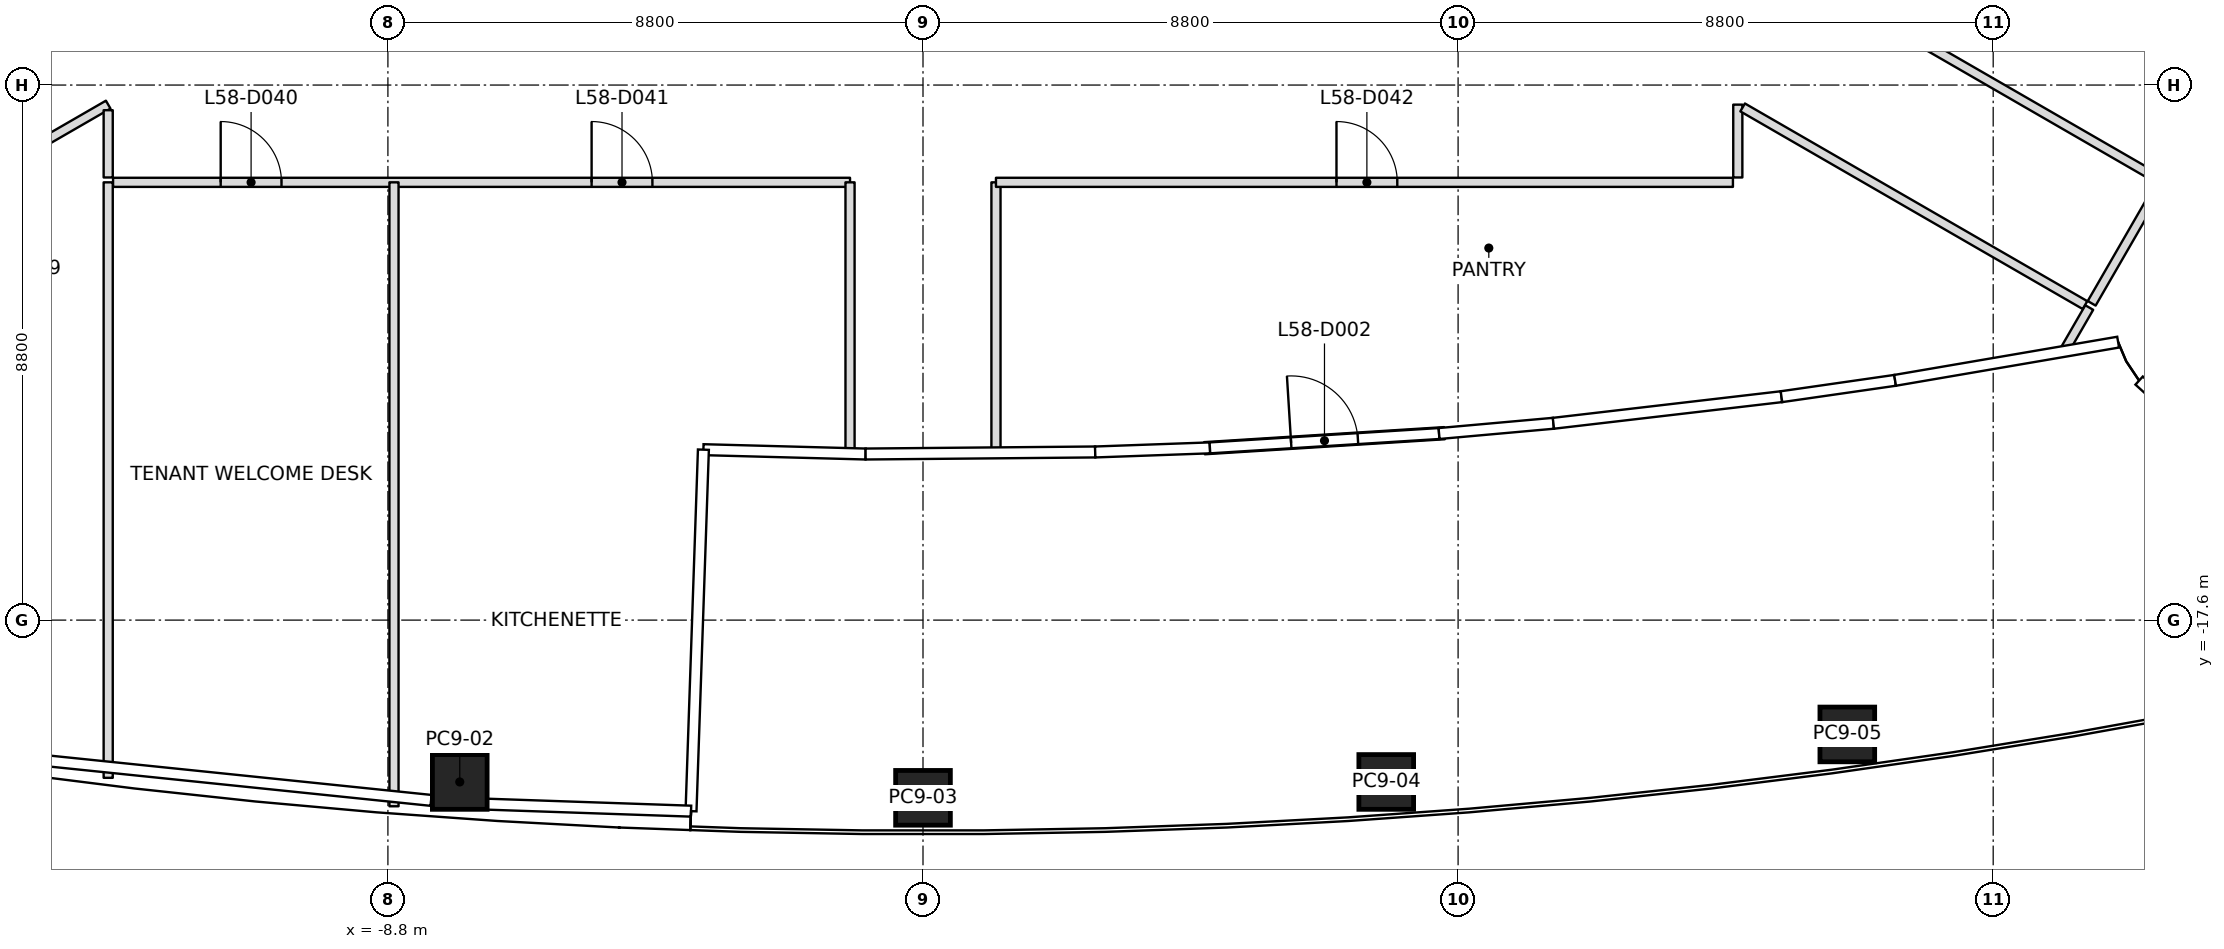
"""IFC4 building model, lengths in metres.
Left out: names, types, materials, properties, quantities, classifications, styles, units other than length and angle.
Written with IfcOpenShell. Run it as: python <this file> out.ifc"""

import sys

from ifc_helpers import new_model, si_unit, direction, frame, frame_2d, origin, origin_2d, place, context, subcontext, project, spatial, rectangle, extrude, element, fill, save


model = new_model("IFC4")
c1 = context("Model", 3, precision=1e-05, world=origin(), true_north=direction((0.0, 1.0)))
c2 = subcontext(c1, "Body", "Model", "MODEL_VIEW")
j1 = project(units=[si_unit("LENGTHUNIT", "METRE"), si_unit("PLANEANGLEUNIT", "RADIAN")], contexts=[c1])
p1 = place(None, origin())
s1 = spatial("IfcSite", under=j1, at=p1, CompositionType="ELEMENT")
p2 = place(p1, origin())
s2 = spatial("IfcBuilding", under=s1, at=p2, CompositionType="ELEMENT")
p3 = place(p2, frame((0.0, 0.0, 259.0)))
s3 = spatial("IfcBuildingStorey", under=s2, at=p3, CompositionType="ELEMENT", Elevation=259.0)
p4 = place(p3, frame((-7.618, -20.262, 0.0), z_axis=(0.008788174922, 0.01116830563, 0.999899013366), x_axis=(-0.997618130279, 0.068512919133, 0.008002877598)))
e1 = element("IfcColumn", 1, at=p4, inside=s3, PredefinedType="COLUMN", context=c2, shape_type="SweptSolid", body=[
    extrude(rectangle(XDim=0.9, YDim=0.9, at=origin_2d()), origin(), (0.0, 0.0, 1.0), 4.0),
])
p5 = place(p3, frame((0.0, -20.523, 0.0), z_axis=(0.0, 0.011473854038, 0.99993417317), x_axis=(1.0, 0.0, 0.0)))
e2 = element("IfcColumn", 2, at=p5, inside=s3, PredefinedType="COLUMN", context=c2, shape_type="SweptSolid", body=[
    extrude(rectangle(XDim=0.9, YDim=0.9, at=origin_2d()), origin(), (0.0, 0.0, 1.0), 4.0),
])
p6 = place(p3, frame((7.618, -20.262, 0.0), z_axis=(-0.008788174922, 0.01116830563, 0.999899013366), x_axis=(0.997618130279, 0.068512919133, 0.008002877598)))
e3 = element("IfcColumn", 3, at=p6, inside=s3, PredefinedType="COLUMN", context=c2, shape_type="SweptSolid", body=[
    extrude(rectangle(XDim=0.9, YDim=0.9, at=origin_2d()), origin(), (0.0, 0.0, 1.0), 4.0),
])
p7 = place(p3, frame((15.201, -19.48, 0.0), z_axis=(-0.017452445502, 0.010434853779, 0.999793241612), x_axis=(0.990486490869, 0.136692598023, 0.015863324104)))
e4 = element("IfcColumn", 4, at=p7, inside=s3, PredefinedType="COLUMN", context=c2, shape_type="SweptSolid", body=[
    extrude(rectangle(XDim=0.9, YDim=0.9, at=origin_2d()), origin(), (0.0, 0.0, 1.0), 4.001),
])
p8 = place(p3, frame((4.629, -14.773, 0.0), z_axis=(0.0, 0.0, 1.0), x_axis=(0.99804368287, 0.062520453327, 0.0)))
e5 = element("IfcWall", 5, at=p8, inside=s3, PredefinedType="SOLIDWALL", context=c2, shape_type="SweptSolid", body=[
    extrude(rectangle(XDim=3.956, YDim=0.2, at=frame_2d((1.978, 0.0))), origin(), (0.0, 0.0, 1.0), 3.34),
])
p9 = place(p8, frame((1.428, 0.0, 0.0)))
e6 = element("IfcOpeningElement", 6, at=p9, cuts=e5, PredefinedType="OPENING", context=c2, shape_type="SweptSolid", body=[
    extrude(rectangle(XDim=1.1, YDim=2.1, at=frame_2d((0.55, 1.05))), frame((0.0, 0.1, 0.0), z_axis=(0.0, -1.0, 0.0), x_axis=(1.0, 0.0, 0.0)), (0.0, 0.0, 1.0), 0.2),
])
p10 = place(p3, frame((-13.4, -10.4, 0.0), z_axis=(0.0, 0.0, 1.0), x_axis=(0.0, -1.0, 0.0)))
e7 = element("IfcWall", 7, at=p10, inside=s3, PredefinedType="PARTITIONING", context=c2, shape_type="SweptSolid", body=[
    extrude(rectangle(XDim=9.794, YDim=0.15, at=frame_2d((4.897, 0.0))), origin(), (0.0, 0.0, 1.0), 3.234),
])
p11 = place(p3, frame((-8.7, -10.4, 0.0), z_axis=(0.0, 0.0, 1.0), x_axis=(0.0, -1.0, 0.0)))
e8 = element("IfcWall", 8, at=p11, inside=s3, PredefinedType="PARTITIONING", context=c2, shape_type="SweptSolid", body=[
    extrude(rectangle(XDim=10.262, YDim=0.15, at=frame_2d((5.131, 0.0))), origin(), (0.0, 0.0, 1.0), 3.234),
])
p12 = place(p3, frame((19.18, -12.459, 0.0), z_axis=(0.0, 0.0, 1.0), x_axis=(-0.499930913282, -0.866065287345, 0.0)))
e9 = element("IfcWall", 9, at=p12, inside=s3, PredefinedType="PARTITIONING", context=c2, shape_type="SweptSolid", body=[
    extrude(rectangle(XDim=0.845, YDim=0.15, at=frame_2d((0.422, 0.0))), origin(), (0.0, 0.0, 1.0), 3.45),
])
p13 = place(p3, frame((-13.4, -6.351, 0.0), z_axis=(0.0, 0.0, 1.0), x_axis=(-0.866031719379, -0.499989060909, 0.0)))
e10 = element("IfcWall", 10, at=p13, inside=s3, PredefinedType="PARTITIONING", context=c2, shape_type="SweptSolid", body=[
    extrude(rectangle(XDim=7.98, YDim=0.15, at=frame_2d((3.99, 0.0))), origin(), (0.0, 0.0, 1.0), 3.317),
])
p14 = place(p13, frame((2.05, 0.0, 0.0)))
e11 = element("IfcOpeningElement", 11, at=p14, cuts=e10, PredefinedType="OPENING", context=c2, shape_type="SweptSolid", body=[
    extrude(rectangle(XDim=0.9, YDim=2.1, at=frame_2d((0.45, 1.05))), frame((0.0, 0.075, 0.0), z_axis=(0.0, -1.0, 0.0), x_axis=(1.0, 0.0, 0.0)), (0.0, 0.0, 1.0), 0.15),
])
p15 = place(p13, frame((6.08, 0.0, 0.0)))
e12 = element("IfcOpeningElement", 12, at=p15, cuts=e10, PredefinedType="OPENING", context=c2, shape_type="SweptSolid", body=[
    extrude(rectangle(XDim=1.0, YDim=2.1, at=frame_2d((0.5, 1.05))), frame((0.0, 0.075, 0.0), z_axis=(0.0, -1.0, 0.0), x_axis=(1.0, 0.0, 0.0)), (0.0, 0.0, 1.0), 0.15),
])
p16 = place(p3, frame((-19.111, -12.419, 0.0), z_axis=(0.0, 0.0, 1.0), x_axis=(0.866022199768, 0.500005549479, 0.0)))
e13 = element("IfcWall", 13, at=p16, inside=s3, PredefinedType="PARTITIONING", context=c2, shape_type="SweptSolid", body=[
    extrude(rectangle(XDim=6.594, YDim=0.15, at=frame_2d((3.297, 0.0))), origin(), (0.0, 0.0, 1.0), 3.233),
])
p17 = place(p16, frame((0.95, 0.0, 0.0)))
e14 = element("IfcOpeningElement", 14, at=p17, cuts=e13, PredefinedType="OPENING", context=c2, shape_type="SweptSolid", body=[
    extrude(rectangle(XDim=0.9, YDim=2.1, at=frame_2d((0.45, 1.05))), frame((0.0, 0.075, 0.0), z_axis=(0.0, -1.0, 0.0), x_axis=(1.0, 0.0, 0.0)), (0.0, 0.0, 1.0), 0.15),
])
p18 = place(p16, frame((4.297, 0.0, 0.0)))
e15 = element("IfcOpeningElement", 15, at=p18, cuts=e13, PredefinedType="OPENING", context=c2, shape_type="SweptSolid", body=[
    extrude(rectangle(XDim=1.0, YDim=2.1, at=frame_2d((0.5, 1.05))), frame((0.0, 0.075, 0.0), z_axis=(0.0, -1.0, 0.0), x_axis=(1.0, 0.0, 0.0)), (0.0, 0.0, 1.0), 0.15),
])
p19 = place(p3, frame((-13.4, -9.214, 0.0), z_axis=(0.0, 0.0, 1.0), x_axis=(0.0, -1.0, 0.0)))
e16 = element("IfcWall", 16, at=p19, inside=s3, PredefinedType="PARTITIONING", context=c2, shape_type="SweptSolid", body=[
    extrude(rectangle(XDim=1.106, YDim=0.15, at=frame_2d((0.553, 0.0))), origin(), (0.0, 0.0, 1.0), 3.233),
])
p20 = place(p3, frame((-13.32, -10.4, 0.0), z_axis=(0.0, 0.0, 1.0), x_axis=(1.0, 0.0, 0.0)))
e17 = element("IfcWall", 17, at=p20, inside=s3, PredefinedType="PARTITIONING", context=c2, shape_type="SweptSolid", body=[
    extrude(rectangle(XDim=12.12, YDim=0.15, at=frame_2d((6.06, 0.0))), origin(), (0.0, 0.0, 1.0), 3.317),
])
p21 = place(p20, frame((1.77, 0.0, 0.0)))
e18 = element("IfcOpeningElement", 18, at=p21, cuts=e17, PredefinedType="OPENING", context=c2, shape_type="SweptSolid", body=[
    extrude(rectangle(XDim=1.0, YDim=2.1, at=frame_2d((0.5, 1.05))), frame((0.0, 0.075, 0.0), z_axis=(0.0, -1.0, 0.0), x_axis=(1.0, 0.0, 0.0)), (0.0, 0.0, 1.0), 0.15),
])
p22 = place(p20, frame((7.87, 0.0, 0.0)))
e19 = element("IfcOpeningElement", 19, at=p22, cuts=e17, PredefinedType="OPENING", context=c2, shape_type="SweptSolid", body=[
    extrude(rectangle(XDim=1.0, YDim=2.1, at=frame_2d((0.5, 1.05))), frame((0.0, 0.075, 0.0), z_axis=(0.0, -1.0, 0.0), x_axis=(1.0, 0.0, 0.0)), (0.0, 0.0, 1.0), 0.15),
])
for number, where, z_axis, x_axis in (
    (20, (-1.2, -10.4, 0.0), (0.0, 0.0, 1.0), (0.0, -1.0, 0.0)),
    (21, (1.2, -14.864, 0.0), (0.0, 0.0, 1.0), (0.0, 1.0, 0.0)),
):
    element("IfcWall", number, at=place(p3, frame(where, z_axis=z_axis, x_axis=x_axis)), inside=s3, PredefinedType="PARTITIONING", context=c2, shape_type="SweptSolid", body=[
        extrude(rectangle(XDim=4.464, YDim=0.15, at=frame_2d((2.232, 0.0))), origin(), (0.0, 0.0, 1.0), 3.45),
    ])
p23 = place(p3, frame((1.2, -10.4, 0.0), z_axis=(0.0, 0.0, 1.0), x_axis=(1.0, 0.0, 0.0)))
e22 = element("IfcWall", 22, at=p23, inside=s3, PredefinedType="PARTITIONING", context=c2, shape_type="SweptSolid", body=[
    extrude(rectangle(XDim=12.12, YDim=0.15, at=frame_2d((6.06, 0.0))), origin(), (0.0, 0.0, 1.0), 3.317),
])
p24 = place(p23, frame((5.6, 0.0, 0.0)))
e23 = element("IfcOpeningElement", 23, at=p24, cuts=e22, PredefinedType="OPENING", context=c2, shape_type="SweptSolid", body=[
    extrude(rectangle(XDim=1.0, YDim=2.1, at=frame_2d((0.5, 1.05))), frame((0.0, 0.075, 0.0), z_axis=(0.0, -1.0, 0.0), x_axis=(1.0, 0.0, 0.0)), (0.0, 0.0, 1.0), 0.15),
])
p25 = place(p3, frame((13.4, -10.32, 0.0), z_axis=(0.0, 0.0, 1.0), x_axis=(0.0, 1.0, 0.0)))
e24 = element("IfcWall", 24, at=p25, inside=s3, PredefinedType="PARTITIONING", context=c2, shape_type="SweptSolid", body=[
    extrude(rectangle(XDim=1.198, YDim=0.15, at=frame_2d((0.599, 0.0))), origin(), (0.0, 0.0, 1.0), 3.233),
])
p26 = place(p3, frame((13.479, -9.168, 0.0), z_axis=(0.0, 0.0, 1.0), x_axis=(0.866028026295, -0.499995457651, 0.0)))
e25 = element("IfcWall", 25, at=p26, inside=s3, PredefinedType="PARTITIONING", context=c2, shape_type="SweptSolid", body=[
    extrude(rectangle(XDim=6.502, YDim=0.15, at=frame_2d((3.251, 0.0))), origin(), (0.0, 0.0, 1.0), 3.233),
])
p27 = place(p3, frame((20.311, -10.341, 0.0), z_axis=(0.0, 0.0, 1.0), x_axis=(-0.866031719379, 0.499989060909, 0.0)))
e26 = element("IfcWall", 26, at=p27, inside=s3, PredefinedType="PARTITIONING", context=c2, shape_type="SweptSolid", body=[
    extrude(rectangle(XDim=7.98, YDim=0.15, at=frame_2d((3.99, 0.0))), origin(), (0.0, 0.0, 1.0), 3.317),
])
p28 = place(p3, frame((19.22, -12.39, 0.0), z_axis=(0.0, 0.0, 1.0), x_axis=(0.500030632641, 0.866007717299, 0.0)))
e27 = element("IfcWall", 27, at=p28, inside=s3, PredefinedType="PARTITIONING", context=c2, shape_type="SweptSolid", body=[
    extrude(rectangle(XDim=2.24, YDim=0.15, at=frame_2d((1.12, 0.0))), origin(), (0.0, 0.0, 1.0), 3.233),
])
p29 = place(p9, origin())
e28 = element("IfcDoor", 28, at=p29, inside=s3, OperationType="SINGLE_SWING_RIGHT", PredefinedType="DOOR", context=c2, shape_type="SweptSolid", body=[
    extrude(rectangle(XDim=1.1, YDim=2.1, at=frame_2d((0.55, 1.05))), frame((0.0, 0.025, 0.0), z_axis=(0.0, -1.0, 0.0), x_axis=(1.0, 0.0, 0.0)), (0.0, 0.0, 1.0), 0.05),
])
fill(e6, e28)
p30 = place(p21, origin())
e29 = element("IfcDoor", 29, at=p30, inside=s3, OperationType="SINGLE_SWING_RIGHT", PredefinedType="DOOR", context=c2, shape_type="SweptSolid", body=[
    extrude(rectangle(XDim=1.0, YDim=2.1, at=frame_2d((0.5, 1.05))), frame((0.0, 0.025, 0.0), z_axis=(0.0, -1.0, 0.0), x_axis=(1.0, 0.0, 0.0)), (0.0, 0.0, 1.0), 0.05),
])
fill(e18, e29)
p31 = place(p22, origin())
e30 = element("IfcDoor", 30, at=p31, inside=s3, OperationType="SINGLE_SWING_LEFT", PredefinedType="DOOR", context=c2, shape_type="SweptSolid", body=[
    extrude(rectangle(XDim=1.0, YDim=2.1, at=frame_2d((0.5, 1.05))), frame((0.0, 0.025, 0.0), z_axis=(0.0, -1.0, 0.0), x_axis=(1.0, 0.0, 0.0)), (0.0, 0.0, 1.0), 0.05),
])
fill(e19, e30)
p32 = place(p24, origin())
e31 = element("IfcDoor", 31, at=p32, inside=s3, OperationType="SINGLE_SWING_RIGHT", PredefinedType="DOOR", context=c2, shape_type="SweptSolid", body=[
    extrude(rectangle(XDim=1.0, YDim=2.1, at=frame_2d((0.5, 1.05))), frame((0.0, 0.025, 0.0), z_axis=(0.0, -1.0, 0.0), x_axis=(1.0, 0.0, 0.0)), (0.0, 0.0, 1.0), 0.05),
])
fill(e23, e31)
save(model, sys.argv[1])
